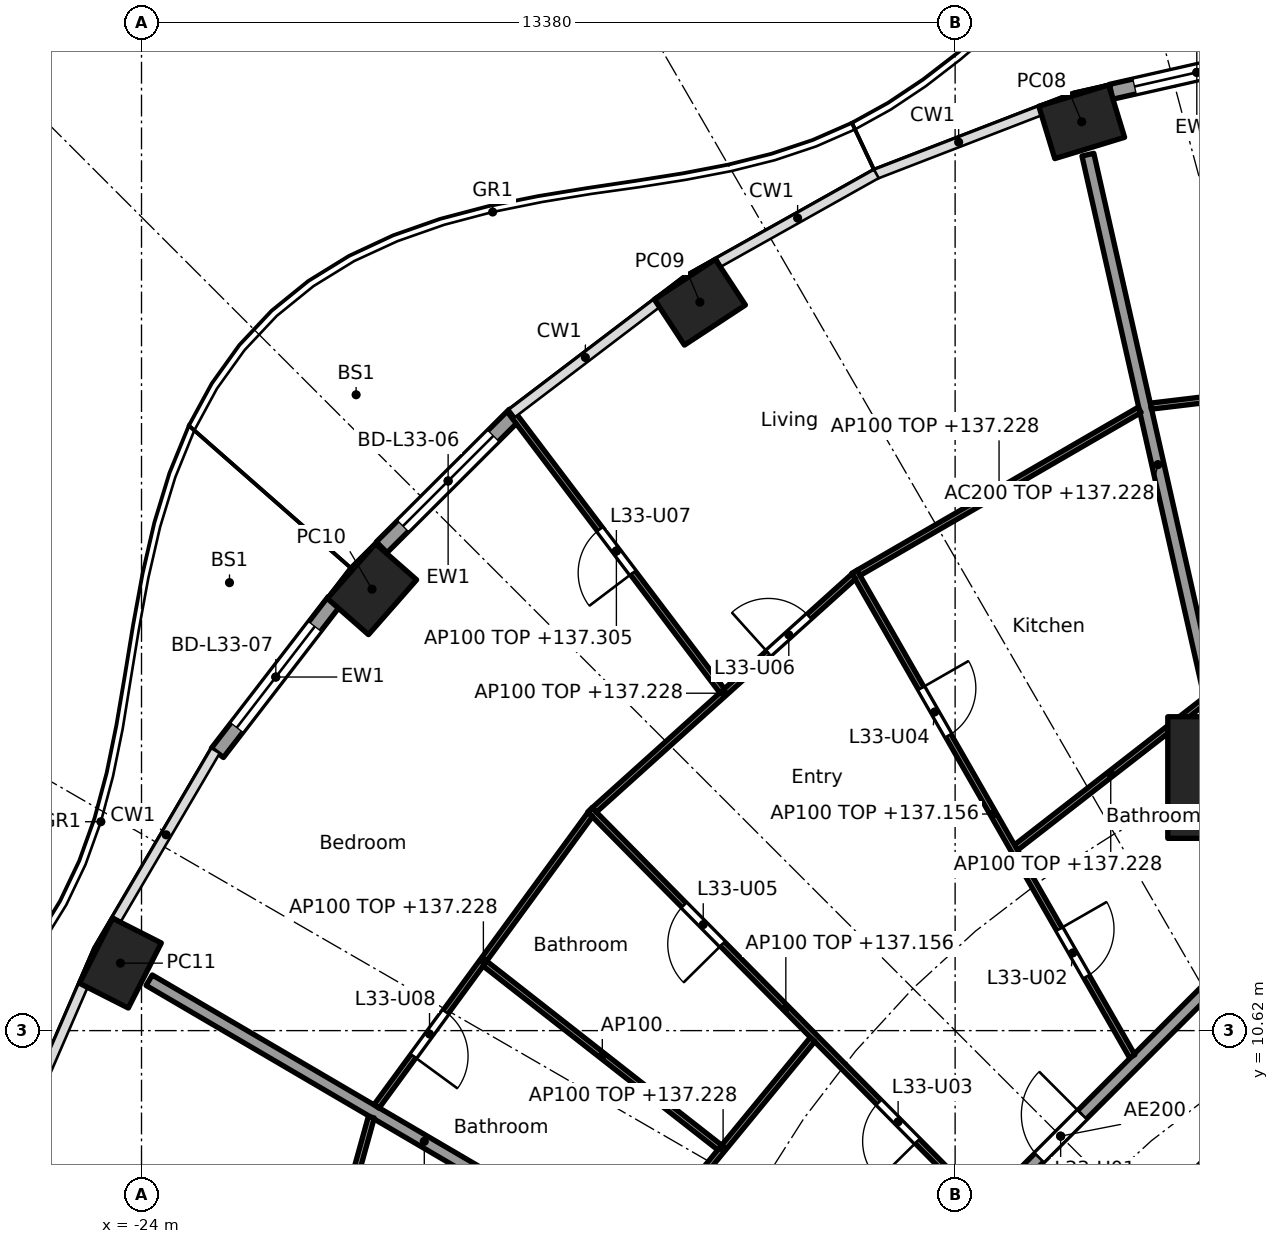
"""IFC4 building model, lengths in metres.
Left out: names, types, materials, properties, quantities, classifications, styles, units other than length and angle.
Written with IfcOpenShell. Run it as: python <this file> out.ifc"""

import sys

from ifc_helpers import new_model, si_unit, direction, frame, frame_2d, origin, origin_2d, place, context, subcontext, project, spatial, rectangle, hollow_rectangle, extrude, element, fill, save


model = new_model("IFC4")
c1 = context("Model", 3, precision=1e-05, world=origin(), true_north=direction((0.0, 1.0)))
c2 = subcontext(c1, "Body", "Model", "MODEL_VIEW")
j1 = project(units=[si_unit("LENGTHUNIT", "METRE"), si_unit("PLANEANGLEUNIT", "RADIAN")], contexts=[c1])
p1 = place(None, origin())
s1 = spatial("IfcSite", under=j1, at=p1, CompositionType="ELEMENT")
p2 = place(p1, origin())
s2 = spatial("IfcBuilding", under=s1, at=p2, CompositionType="ELEMENT")
p3 = place(p2, frame((0.0, 0.0, 134.4)))
s3 = spatial("IfcBuildingStorey", under=s2, at=p3, CompositionType="ELEMENT", Elevation=134.4)
for number, where, z_axis, x_axis in (
    (1, (-8.538, 25.565, 0.0), (0.0, 0.0, 1.0), (-0.957, -0.292, 0.0)),
    (2, (-14.817, 22.599, 0.0), (0.0, 0.0, 1.0), (-0.836, -0.549, 0.0)),
    (3, (-20.209, 17.88, 0.0), (0.0, 0.0, 1.0), (-0.66, -0.751, 0.0)),
    (4, (-24.347, 11.73, 0.0), (0.0, 0.0, 1.0), (-0.452, -0.892, 0.0)),
):
    element("IfcColumn", number, at=place(p3, frame(where, z_axis=z_axis, x_axis=x_axis)), inside=s3, PredefinedType="COLUMN", context=c2, shape_type="SweptSolid", body=[
        extrude(hollow_rectangle(XDim=1.2, YDim=0.9, WallThickness=0.04, at=origin_2d()), origin(), (0.0, 0.0, 1.0), 3.7),
    ])
p4 = place(p3, frame((-6.123, 14.782, 0.0), z_axis=(0.0, 0.0, 1.0), x_axis=(1.0, 0.0, 0.0)))
e5 = element("IfcColumn", 5, at=p4, inside=s3, PredefinedType="COLUMN", context=c2, shape_type="SweptSolid", body=[
    extrude(rectangle(XDim=2.0, YDim=2.0, at=origin_2d()), origin(), (0.0, 0.0, 1.0), 3.7),
])
p5 = place(p3, frame((-8.055, 26.059, 0.0), z_axis=(0.0, 0.0, 1.0), x_axis=(0.975339035722, 0.220711951186, 0.0)))
e6 = element("IfcWall", 6, at=p5, inside=s3, PredefinedType="SOLIDWALL", context=c2, shape_type="SweptSolid", body=[
    extrude(rectangle(XDim=2.89, YDim=0.25, at=frame_2d((1.445, 0.0))), origin(), (0.0, 0.0, 1.0), 3.44),
])
p6 = place(p5, frame((0.395, 0.0, 0.0)))
e7 = element("IfcOpeningElement", 7, at=p6, cuts=e6, PredefinedType="OPENING", context=c2, shape_type="SweptSolid", body=[
    extrude(rectangle(XDim=2.1, YDim=2.4, at=frame_2d((1.05, 1.2))), frame((0.0, 0.135, 0.0), z_axis=(0.0, -1.0, 0.0), x_axis=(1.0, 0.0, 0.0)), (0.0, 0.0, 1.0), 0.27),
])
p7 = place(p3, frame((-20.05, 18.569, 0.0), z_axis=(0.0, 0.0, 1.0), x_axis=(0.707857823335, 0.706354940482, 0.0)))
e8 = element("IfcWall", 8, at=p7, inside=s3, PredefinedType="SOLIDWALL", context=c2, shape_type="SweptSolid", body=[
    extrude(rectangle(XDim=3.086, YDim=0.25, at=frame_2d((1.543, 0.0))), origin(), (0.0, 0.0, 1.0), 3.44),
])
p8 = place(p7, frame((0.493, 0.0, 0.0)))
e9 = element("IfcOpeningElement", 9, at=p8, cuts=e8, PredefinedType="OPENING", context=c2, shape_type="SweptSolid", body=[
    extrude(rectangle(XDim=2.1, YDim=2.4, at=frame_2d((1.05, 1.2))), frame((0.0, 0.135, 0.0), z_axis=(0.0, -1.0, 0.0), x_axis=(1.0, 0.0, 0.0)), (0.0, 0.0, 1.0), 0.27),
])
p9 = place(p3, frame((-22.753, 15.188, 0.0), z_axis=(0.0, 0.0, 1.0), x_axis=(0.610429847179, 0.792070326217, 0.0)))
e10 = element("IfcWall", 10, at=p9, inside=s3, PredefinedType="SOLIDWALL", context=c2, shape_type="SweptSolid", body=[
    extrude(rectangle(XDim=3.149, YDim=0.25, at=frame_2d((1.575, 0.0))), origin(), (0.0, 0.0, 1.0), 3.44),
])
p10 = place(p9, frame((0.525, 0.0, 0.0)))
e11 = element("IfcOpeningElement", 11, at=p10, cuts=e10, PredefinedType="OPENING", context=c2, shape_type="SweptSolid", body=[
    extrude(rectangle(XDim=2.1, YDim=2.4, at=frame_2d((1.05, 1.2))), frame((0.0, 0.135, 0.0), z_axis=(0.0, -1.0, 0.0), x_axis=(1.0, 0.0, 0.0)), (0.0, 0.0, 1.0), 0.27),
])
p11 = place(p3, frame((-4.613, 9.988, 0.0), z_axis=(0.0, 0.0, 1.0), x_axis=(-0.707106781187, -0.707106781187, 0.0)))
e12 = element("IfcWall", 12, at=p11, inside=s3, PredefinedType="SHEAR", context=c2, shape_type="SweptSolid", body=[
    extrude(rectangle(XDim=7.602, YDim=0.6, at=frame_2d((3.801, 0.0))), origin(), (0.0, 0.0, 1.0), 3.44),
])
p12 = place(p11, frame((0.351, 0.0, 0.0)))
e13 = element("IfcOpeningElement", 13, at=p12, cuts=e12, PredefinedType="OPENING", context=c2, shape_type="SweptSolid", body=[
    extrude(rectangle(XDim=1.1, YDim=2.1, at=frame_2d((0.55, 1.05))), frame((0.0, 0.31, 0.0), z_axis=(0.0, -1.0, 0.0), x_axis=(1.0, 0.0, 0.0)), (0.0, 0.0, 1.0), 0.62),
])
p13 = place(p3, frame((-6.134, 14.831, 0.0), z_axis=(0.0, 0.0, 1.0), x_axis=(-0.220337590808, 0.975423675167, 0.0)))
e14 = element("IfcWall", 14, at=p13, inside=s3, PredefinedType="PARTITIONING", context=c2, shape_type="SweptSolid", body=[
    extrude(rectangle(XDim=10.451, YDim=0.2, at=frame_2d((5.226, 0.0))), origin(), (0.0, 0.0, 1.0), 2.828),
])
p14 = place(p3, frame((-14.825, 6.148, 0.0), z_axis=(0.0, 0.0, 1.0), x_axis=(-0.862852031662, 0.505456597006, 0.0)))
e15 = element("IfcWall", 15, at=p14, inside=s3, PredefinedType="PARTITIONING", context=c2, shape_type="SweptSolid", body=[
    extrude(rectangle(XDim=10.487, YDim=0.2, at=frame_2d((5.244, 0.0))), origin(), (0.0, 0.0, 1.0), 2.828),
])
p15 = place(p3, frame((-5.275, 12.494, 0.0), z_axis=(0.0, 0.0, 1.0), x_axis=(-0.707106781187, -0.707106781187, 0.0)))
e16 = element("IfcWall", 16, at=p15, inside=s3, PredefinedType="PARTITIONING", context=c2, shape_type="SweptSolid", body=[
    extrude(rectangle(XDim=10.209, YDim=0.2, at=frame_2d((5.104, 0.0))), origin(), (0.0, 0.0, 1.0), 3.44),
])
p16 = place(p15, frame((4.604, 0.0, 0.0)))
e17 = element("IfcOpeningElement", 17, at=p16, cuts=e16, PredefinedType="OPENING", context=c2, shape_type="SweptSolid", body=[
    extrude(rectangle(XDim=1.0, YDim=2.1, at=frame_2d((0.5, 1.05))), frame((0.0, 0.11, 0.0), z_axis=(0.0, -1.0, 0.0), x_axis=(1.0, 0.0, 0.0)), (0.0, 0.0, 1.0), 0.22),
])
p17 = place(p3, frame((-1.825, 21.557, 0.0), z_axis=(0.0, 0.0, 1.0), x_axis=(-0.992915053711, -0.11882632753, 0.0)))
e18 = element("IfcWall", 18, at=p17, inside=s3, PredefinedType="PARTITIONING", context=c2, shape_type="SweptSolid", body=[
    extrude(rectangle(XDim=5.615, YDim=0.1, at=frame_2d((2.808, 0.0))), origin(), (0.0, 0.0, 1.0), 2.828),
])
p18 = place(p17, frame((2.358, 0.0, 0.0)))
e19 = element("IfcOpeningElement", 19, at=p18, cuts=e18, PredefinedType="OPENING", context=c2, shape_type="SweptSolid", body=[
    extrude(rectangle(XDim=0.9, YDim=2.1, at=frame_2d((0.45, 1.05))), frame((0.0, 0.06, 0.0), z_axis=(0.0, -1.0, 0.0), x_axis=(1.0, 0.0, 0.0)), (0.0, 0.0, 1.0), 0.12),
])
p19 = place(p3, frame((-6.503, 16.054, 0.0), z_axis=(0.0, 0.0, 1.0), x_axis=(-0.789428807693, -0.613842127574, 0.0)))
e20 = element("IfcWall", 20, at=p19, inside=s3, PredefinedType="PARTITIONING", context=c2, shape_type="SweptSolid", body=[
    extrude(rectangle(XDim=3.948, YDim=0.1, at=frame_2d((1.974, 0.0))), origin(), (0.0, 0.0, 1.0), 2.828),
])
p20 = place(p3, frame((-7.586, 20.827, 0.0), z_axis=(0.0, 0.0, 1.0), x_axis=(-0.865093450578, -0.501610727325, 0.0)))
e21 = element("IfcWall", 21, at=p20, inside=s3, PredefinedType="PARTITIONING", context=c2, shape_type="SweptSolid", body=[
    extrude(rectangle(XDim=5.343, YDim=0.1, at=frame_2d((2.671, 0.0))), origin(), (0.0, 0.0, 1.0), 2.828),
])
p21 = place(p3, frame((-7.708, 10.198, 0.0), z_axis=(0.0, 0.0, 1.0), x_axis=(-0.497449462689, 0.867492957937, 0.0)))
e22 = element("IfcWall", 22, at=p21, inside=s3, PredefinedType="PARTITIONING", context=c2, shape_type="SweptSolid", body=[
    extrude(rectangle(XDim=9.185, YDim=0.1, at=frame_2d((4.592, 0.0))), origin(), (0.0, 0.0, 1.0), 2.756),
])
p22 = place(p21, frame((1.511, 0.0, 0.0)))
e23 = element("IfcOpeningElement", 23, at=p22, cuts=e22, PredefinedType="OPENING", context=c2, shape_type="SweptSolid", body=[
    extrude(rectangle(XDim=0.9, YDim=2.1, at=frame_2d((0.45, 1.05))), frame((0.0, 0.06, 0.0), z_axis=(0.0, -1.0, 0.0), x_axis=(1.0, 0.0, 0.0)), (0.0, 0.0, 1.0), 0.12),
])
p23 = place(p21, frame((6.078, 0.0, 0.0)))
e24 = element("IfcOpeningElement", 24, at=p23, cuts=e22, PredefinedType="OPENING", context=c2, shape_type="SweptSolid", body=[
    extrude(rectangle(XDim=0.9, YDim=2.1, at=frame_2d((0.45, 1.05))), frame((0.0, 0.06, 0.0), z_axis=(0.0, -1.0, 0.0), x_axis=(1.0, 0.0, 0.0)), (0.0, 0.0, 1.0), 0.12),
])
p24 = place(p3, frame((-12.289, 18.089, 0.0), z_axis=(0.0, 0.0, 1.0), x_axis=(-0.743146066164, -0.669129228435, 0.0)))
e25 = element("IfcWall", 25, at=p24, inside=s3, PredefinedType="PARTITIONING", context=c2, shape_type="SweptSolid", body=[
    extrude(rectangle(XDim=5.739, YDim=0.1, at=frame_2d((2.87, 0.0))), origin(), (0.0, 0.0, 1.0), 2.828),
])
p25 = place(p24, frame((0.985, 0.0, 0.0)))
e26 = element("IfcOpeningElement", 26, at=p25, cuts=e25, PredefinedType="OPENING", context=c2, shape_type="SweptSolid", body=[
    extrude(rectangle(XDim=0.9, YDim=2.1, at=frame_2d((0.45, 1.05))), frame((0.0, 0.06, 0.0), z_axis=(0.0, -1.0, 0.0), x_axis=(1.0, 0.0, 0.0)), (0.0, 0.0, 1.0), 0.12),
])
p26 = place(p3, frame((-14.452, 16.208, 0.0), z_axis=(0.0, 0.0, 1.0), x_axis=(-0.603267974074, 0.797538557975, 0.0)))
e27 = element("IfcWall", 27, at=p26, inside=s3, PredefinedType="PARTITIONING", context=c2, shape_type="SweptSolid", body=[
    extrude(rectangle(XDim=5.764, YDim=0.1, at=frame_2d((2.882, 0.0))), origin(), (0.0, 0.0, 1.0), 2.905),
])
p27 = place(p26, frame((2.432, 0.0, 0.0)))
e28 = element("IfcOpeningElement", 28, at=p27, cuts=e27, PredefinedType="OPENING", context=c2, shape_type="SweptSolid", body=[
    extrude(rectangle(XDim=0.9, YDim=2.1, at=frame_2d((0.45, 1.05))), frame((0.0, 0.06, 0.0), z_axis=(0.0, -1.0, 0.0), x_axis=(1.0, 0.0, 0.0)), (0.0, 0.0, 1.0), 0.12),
])
p28 = place(p3, frame((-10.182, 7.729, 0.0), z_axis=(0.0, 0.0, 1.0), x_axis=(-0.702927211734, 0.711261790766, 0.0)))
e29 = element("IfcWall", 29, at=p28, inside=s3, PredefinedType="PARTITIONING", context=c2, shape_type="SweptSolid", body=[
    extrude(rectangle(XDim=9.168, YDim=0.1, at=frame_2d((4.584, 0.0))), origin(), (0.0, 0.0, 1.0), 2.756),
])
p29 = place(p28, frame((1.507, 0.0, 0.0)))
e30 = element("IfcOpeningElement", 30, at=p29, cuts=e29, PredefinedType="OPENING", context=c2, shape_type="SweptSolid", body=[
    extrude(rectangle(XDim=0.9, YDim=2.1, at=frame_2d((0.45, 1.05))), frame((0.0, 0.06, 0.0), z_axis=(0.0, -1.0, 0.0), x_axis=(1.0, 0.0, 0.0)), (0.0, 0.0, 1.0), 0.12),
])
p30 = place(p28, frame((6.067, 0.0, 0.0)))
e31 = element("IfcOpeningElement", 31, at=p30, cuts=e29, PredefinedType="OPENING", context=c2, shape_type="SweptSolid", body=[
    extrude(rectangle(XDim=0.9, YDim=2.1, at=frame_2d((0.45, 1.05))), frame((0.0, 0.06, 0.0), z_axis=(0.0, -1.0, 0.0), x_axis=(1.0, 0.0, 0.0)), (0.0, 0.0, 1.0), 0.12),
])
p31 = place(p3, frame((-12.965, 10.475, 0.0), z_axis=(0.0, 0.0, 1.0), x_axis=(-0.634943961338, -0.772558195841, 0.0)))
e32 = element("IfcWall", 32, at=p31, inside=s3, PredefinedType="PARTITIONING", context=c2, shape_type="SweptSolid", body=[
    extrude(rectangle(XDim=4.632, YDim=0.1, at=frame_2d((2.316, 0.0))), origin(), (0.0, 0.0, 1.0), 2.828),
])
p32 = place(p3, frame((-16.621, 14.174, 0.0), z_axis=(0.0, 0.0, 1.0), x_axis=(-0.590674917338, -0.806909624449, 0.0)))
e33 = element("IfcWall", 33, at=p32, inside=s3, PredefinedType="PARTITIONING", context=c2, shape_type="SweptSolid", body=[
    extrude(rectangle(XDim=5.949, YDim=0.1, at=frame_2d((2.975, 0.0))), origin(), (0.0, 0.0, 1.0), 2.828),
])
p33 = place(p32, frame((4.024, 0.0, 0.0)))
e34 = element("IfcOpeningElement", 34, at=p33, cuts=e33, PredefinedType="OPENING", context=c2, shape_type="SweptSolid", body=[
    extrude(rectangle(XDim=0.9, YDim=2.1, at=frame_2d((0.45, 1.05))), frame((0.0, 0.06, 0.0), z_axis=(0.0, -1.0, 0.0), x_axis=(1.0, 0.0, 0.0)), (0.0, 0.0, 1.0), 0.12),
])
p34 = place(p3, frame((-14.491, 8.697, 0.0), z_axis=(0.0, 0.0, 1.0), x_axis=(-0.787139479951, 0.616775031193, 0.0)))
e35 = element("IfcWall", 35, at=p34, inside=s3, PredefinedType="PARTITIONING", context=c2, shape_type="SweptSolid", body=[
    extrude(rectangle(XDim=4.907, YDim=0.1, at=frame_2d((2.453, 0.0))), origin(), (0.0, 0.0, 1.0), 3.44),
])
p35 = place(p3, frame((-20.221, 9.197, 0.0), z_axis=(0.0, 0.0, 1.0), x_axis=(-0.267398009191, -0.963586168789, 0.0)))
e36 = element("IfcWall", 36, at=p35, inside=s3, PredefinedType="PARTITIONING", context=c2, shape_type="SweptSolid", body=[
    extrude(rectangle(XDim=5.788, YDim=0.1, at=frame_2d((2.894, 0.0))), origin(), (0.0, 0.0, 1.0), 2.828),
])
p36 = place(p6, origin())
e37 = element("IfcDoor", 37, at=p36, inside=s3, OperationType="SLIDING_TO_LEFT", PredefinedType="DOOR", context=c2, shape_type="SweptSolid", body=[
    extrude(rectangle(XDim=2.1, YDim=2.4, at=frame_2d((1.05, 1.2))), frame((0.0, 0.025, 0.0), z_axis=(0.0, -1.0, 0.0), x_axis=(1.0, 0.0, 0.0)), (0.0, 0.0, 1.0), 0.05),
])
fill(e7, e37)
p37 = place(p8, origin())
e38 = element("IfcDoor", 38, at=p37, inside=s3, OperationType="SLIDING_TO_LEFT", PredefinedType="DOOR", context=c2, shape_type="SweptSolid", body=[
    extrude(rectangle(XDim=2.1, YDim=2.4, at=frame_2d((1.05, 1.2))), frame((0.0, 0.025, 0.0), z_axis=(0.0, -1.0, 0.0), x_axis=(1.0, 0.0, 0.0)), (0.0, 0.0, 1.0), 0.05),
])
fill(e9, e38)
p38 = place(p10, origin())
e39 = element("IfcDoor", 39, at=p38, inside=s3, OperationType="SLIDING_TO_LEFT", PredefinedType="DOOR", context=c2, shape_type="SweptSolid", body=[
    extrude(rectangle(XDim=2.1, YDim=2.4, at=frame_2d((1.05, 1.2))), frame((0.0, 0.025, 0.0), z_axis=(0.0, -1.0, 0.0), x_axis=(1.0, 0.0, 0.0)), (0.0, 0.0, 1.0), 0.05),
])
fill(e11, e39)
p39 = place(p16, frame((1.0, 0.0, 0.0), x_axis=(-1.0, 0.0, 0.0)))
e40 = element("IfcDoor", 40, at=p39, inside=s3, OperationType="SINGLE_SWING_RIGHT", PredefinedType="DOOR", context=c2, shape_type="SweptSolid", body=[
    extrude(rectangle(XDim=1.0, YDim=2.1, at=frame_2d((0.5, 1.05))), frame((0.0, 0.025, 0.0), z_axis=(0.0, -1.0, 0.0), x_axis=(1.0, 0.0, 0.0)), (0.0, 0.0, 1.0), 0.05),
])
fill(e17, e40)
p40 = place(p22, frame((0.9, 0.0, 0.0), x_axis=(-1.0, 0.0, 0.0)))
e41 = element("IfcDoor", 41, at=p40, inside=s3, OperationType="SINGLE_SWING_LEFT", PredefinedType="DOOR", context=c2, shape_type="SweptSolid", body=[
    extrude(rectangle(XDim=0.9, YDim=2.1, at=frame_2d((0.45, 1.05))), frame((0.0, 0.025, 0.0), z_axis=(0.0, -1.0, 0.0), x_axis=(1.0, 0.0, 0.0)), (0.0, 0.0, 1.0), 0.05),
])
fill(e23, e41)
p41 = place(p29, origin())
e42 = element("IfcDoor", 42, at=p41, inside=s3, OperationType="SINGLE_SWING_LEFT", PredefinedType="DOOR", context=c2, shape_type="SweptSolid", body=[
    extrude(rectangle(XDim=0.9, YDim=2.1, at=frame_2d((0.45, 1.05))), frame((0.0, 0.025, 0.0), z_axis=(0.0, -1.0, 0.0), x_axis=(1.0, 0.0, 0.0)), (0.0, 0.0, 1.0), 0.05),
])
fill(e30, e42)
p42 = place(p23, frame((0.9, 0.0, 0.0), x_axis=(-1.0, 0.0, 0.0)))
e43 = element("IfcDoor", 43, at=p42, inside=s3, OperationType="SINGLE_SWING_LEFT", PredefinedType="DOOR", context=c2, shape_type="SweptSolid", body=[
    extrude(rectangle(XDim=0.9, YDim=2.1, at=frame_2d((0.45, 1.05))), frame((0.0, 0.025, 0.0), z_axis=(0.0, -1.0, 0.0), x_axis=(1.0, 0.0, 0.0)), (0.0, 0.0, 1.0), 0.05),
])
fill(e24, e43)
p43 = place(p30, origin())
e44 = element("IfcDoor", 44, at=p43, inside=s3, OperationType="SINGLE_SWING_LEFT", PredefinedType="DOOR", context=c2, shape_type="SweptSolid", body=[
    extrude(rectangle(XDim=0.9, YDim=2.1, at=frame_2d((0.45, 1.05))), frame((0.0, 0.025, 0.0), z_axis=(0.0, -1.0, 0.0), x_axis=(1.0, 0.0, 0.0)), (0.0, 0.0, 1.0), 0.05),
])
fill(e31, e44)
p44 = place(p25, frame((0.9, 0.0, 0.0), x_axis=(-1.0, 0.0, 0.0)))
e45 = element("IfcDoor", 45, at=p44, inside=s3, OperationType="SINGLE_SWING_LEFT", PredefinedType="DOOR", context=c2, shape_type="SweptSolid", body=[
    extrude(rectangle(XDim=0.9, YDim=2.1, at=frame_2d((0.45, 1.05))), frame((0.0, 0.025, 0.0), z_axis=(0.0, -1.0, 0.0), x_axis=(1.0, 0.0, 0.0)), (0.0, 0.0, 1.0), 0.05),
])
fill(e26, e45)
p45 = place(p27, origin())
e46 = element("IfcDoor", 46, at=p45, inside=s3, OperationType="SINGLE_SWING_LEFT", PredefinedType="DOOR", context=c2, shape_type="SweptSolid", body=[
    extrude(rectangle(XDim=0.9, YDim=2.1, at=frame_2d((0.45, 1.05))), frame((0.0, 0.025, 0.0), z_axis=(0.0, -1.0, 0.0), x_axis=(1.0, 0.0, 0.0)), (0.0, 0.0, 1.0), 0.05),
])
fill(e28, e46)
p46 = place(p33, origin())
e47 = element("IfcDoor", 47, at=p46, inside=s3, OperationType="SINGLE_SWING_RIGHT", PredefinedType="DOOR", context=c2, shape_type="SweptSolid", body=[
    extrude(rectangle(XDim=0.9, YDim=2.1, at=frame_2d((0.45, 1.05))), frame((0.0, 0.025, 0.0), z_axis=(0.0, -1.0, 0.0), x_axis=(1.0, 0.0, 0.0)), (0.0, 0.0, 1.0), 0.05),
])
fill(e34, e47)
save(model, sys.argv[1])
